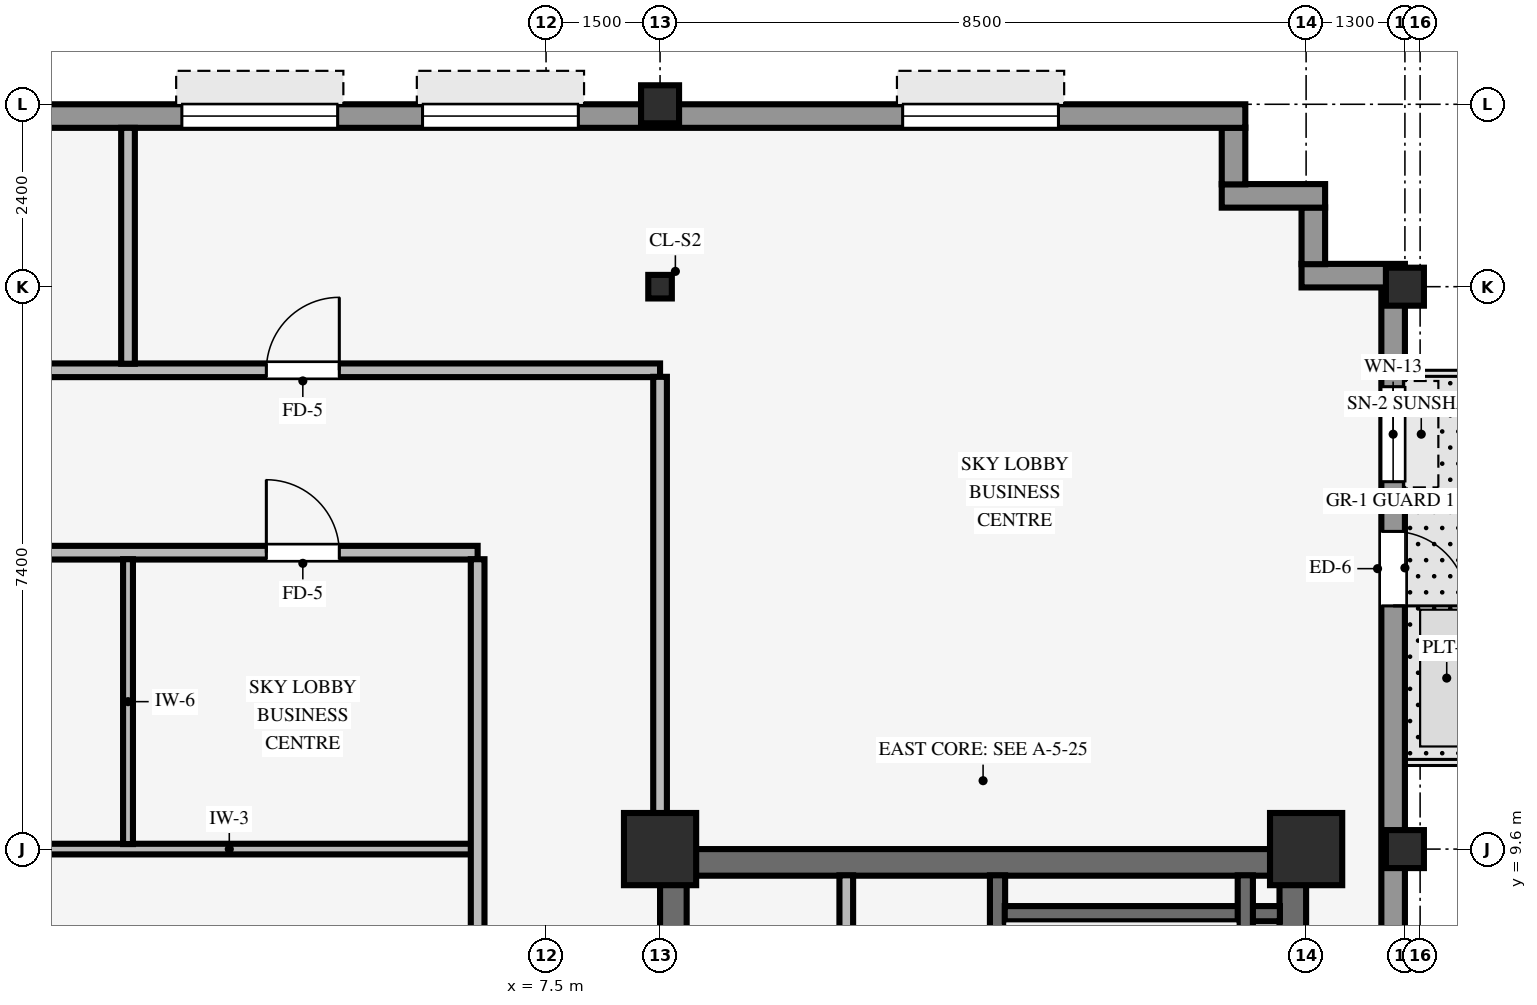
"""IFC4 building model, lengths in metres.
Left out: names, types, materials, properties, quantities, classifications, styles, units other than length and angle.
Written with IfcOpenShell. Run it as: python <this file> out.ifc"""

import sys

from ifc_helpers import new_model, si_unit, direction, frame, frame_2d, origin, origin_2d, place, context, subcontext, project, spatial, rectangle, hollow_rectangle, i_section, extrude, source, transform, mapped, element, fill, save


model = new_model("IFC4")
c1 = context("Model", 3, precision=1e-05, world=origin(), true_north=direction((0.0, 1.0)))
c2 = subcontext(c1, "Body", "Model", "MODEL_VIEW")
j1 = project(units=[si_unit("LENGTHUNIT", "METRE"), si_unit("PLANEANGLEUNIT", "RADIAN")], contexts=[c1])
p1 = place(None, origin())
s1 = spatial("IfcSite", under=j1, at=p1, CompositionType="ELEMENT")
p2 = place(p1, origin())
s2 = spatial("IfcBuilding", under=s1, at=p2, CompositionType="ELEMENT")
p3 = place(p2, frame((0.0, 0.0, 223.75)))
s3 = spatial("IfcBuildingStorey", under=s2, at=p3, CompositionType="ELEMENT", Elevation=223.75)
p4 = place(p3, frame((9.0, 9.425, 0.0), z_axis=(0.0, 0.0, 1.0), x_axis=(1.0, 0.0, 0.0)))
e1 = element("IfcWall", 1, at=p4, inside=s3, PredefinedType="SHEAR", context=c2, shape_type="SweptSolid", body=[
    extrude(rectangle(XDim=8.5, YDim=0.35, at=frame_2d((4.25, 0.0))), origin(), (0.0, 0.0, 1.0), 3.37),
])
p5 = place(p3, frame((9.175, -9.255, 0.0), z_axis=(0.0, 0.0, 1.0), x_axis=(0.0, 1.0, 0.0)))
e2 = element("IfcWall", 2, at=p5, inside=s3, PredefinedType="SHEAR", context=c2, shape_type="SweptSolid", body=[
    extrude(rectangle(XDim=18.51, YDim=0.35, at=frame_2d((9.255, 0.0))), origin(), (0.0, 0.0, 1.0), 3.37),
])
p6 = place(p5, frame((8.655, 0.0, 0.0)))
e3 = element("IfcOpeningElement", 3, at=p6, cuts=e2, PredefinedType="OPENING", context=c2, shape_type="SweptSolid", body=[
    extrude(rectangle(XDim=1.2, YDim=2.15, at=frame_2d((0.6, 1.075))), frame((0.0, 0.185, 0.0), z_axis=(0.0, -1.0, 0.0), x_axis=(1.0, 0.0, 0.0)), (0.0, 0.0, 1.0), 0.37),
])
p7 = place(p3, frame((17.325, -9.255, 0.0), z_axis=(0.0, 0.0, 1.0), x_axis=(0.0, 1.0, 0.0)))
e4 = element("IfcWall", 4, at=p7, inside=s3, PredefinedType="SHEAR", context=c2, shape_type="SweptSolid", body=[
    extrude(rectangle(XDim=18.51, YDim=0.35, at=frame_2d((9.255, 0.0))), origin(), (0.0, 0.0, 1.0), 3.37),
])
for number, where, z_axis, x_axis in (
    (5, (9.0, 9.6, 0.0), (0.0, 0.0, 1.0), (1.0, 0.0, 0.0)),
    (6, (17.5, 9.6, 0.0), (0.0, 0.0, 1.0), (1.0, 0.0, 0.0)),
):
    element("IfcColumn", number, at=place(p3, frame(where, z_axis=z_axis, x_axis=x_axis)), inside=s3, PredefinedType="COLUMN", context=c2, shape_type="SweptSolid", body=[
        extrude(rectangle(XDim=0.95, YDim=0.95, at=origin_2d()), origin(), (0.0, 0.0, 1.0), 3.37),
    ])
for number, where, z_axis, x_axis in (
    (7, (18.8, 9.6, 0.0), (0.0, 0.0, 1.0), (1.0, 0.0, 0.0)),
    (8, (18.8, 17.0, 0.0), (0.0, 0.0, 1.0), (1.0, 0.0, 0.0)),
    (9, (9.0, 19.4, 0.0), (0.0, 0.0, 1.0), (1.0, 0.0, 0.0)),
):
    element("IfcColumn", number, at=place(p3, frame(where, z_axis=z_axis, x_axis=x_axis)), inside=s3, PredefinedType="COLUMN", context=c2, shape_type="SweptSolid", body=[
        extrude(hollow_rectangle(XDim=0.5, YDim=0.5, WallThickness=0.032, InnerFilletRadius=0.032, OuterFilletRadius=0.064, at=origin_2d()), origin(), (0.0, 0.0, 1.0), 3.37),
    ])
p8 = place(p3, frame((9.0, 17.0, 0.0), z_axis=(0.0, 0.0, 1.0), x_axis=(1.0, 0.0, 0.0)))
e10 = element("IfcColumn", 10, at=p8, inside=s3, PredefinedType="COLUMN", context=c2, shape_type="SweptSolid", body=[
    extrude(i_section(OverallWidth=0.31, OverallDepth=0.31, WebThickness=0.015, FlangeThickness=0.015, FilletRadius=0.015, at=origin_2d()), origin(), (0.0, 0.0, 1.0), 3.37),
])
p9 = place(p3, frame((18.645, -16.994, 0.0), z_axis=(0.0, 0.0, 1.0), x_axis=(0.0, 1.0, 0.0)))
e11 = element("IfcWall", 11, at=p9, inside=s3, PredefinedType="STANDARD", context=c2, shape_type="SweptSolid", body=[
    extrude(rectangle(XDim=33.988, YDim=0.31, at=frame_2d((16.994, 0.0))), origin(), (0.0, 0.0, 1.0), 2.705),
])
p10 = place(p9, frame((30.774, 0.0, 0.0), z_axis=(0.0, 0.0, 1.0), x_axis=(-1.0, 0.0, 0.0)))
e12 = element("IfcOpeningElement", 12, at=p10, cuts=e11, PredefinedType="OPENING", context=c2, shape_type="SweptSolid", body=[
    extrude(rectangle(XDim=0.98, YDim=2.15, at=frame_2d((0.49, 1.075))), frame((0.0, 0.165, 0.0), z_axis=(0.0, -1.0, 0.0), x_axis=(1.0, 0.0, 0.0)), (0.0, 0.0, 1.0), 0.33),
])
p11 = place(p9, frame((2.66, 0.0, 0.8)))
e13 = element("IfcOpeningElement", 13, at=p11, cuts=e11, PredefinedType="OPENING", context=c2, shape_type="SweptSolid", body=[
    extrude(rectangle(XDim=1.25, YDim=1.52, at=frame_2d((0.625, 0.76))), frame((0.0, 0.165, 0.0), z_axis=(0.0, -1.0, 0.0), x_axis=(1.0, 0.0, 0.0)), (0.0, 0.0, 1.0), 0.33),
])
p12 = place(p9, frame((31.428, 0.0, 0.8)))
e14 = element("IfcOpeningElement", 14, at=p12, cuts=e11, PredefinedType="OPENING", context=c2, shape_type="SweptSolid", body=[
    extrude(rectangle(XDim=1.25, YDim=1.52, at=frame_2d((0.625, 0.76))), frame((0.0, 0.165, 0.0), z_axis=(0.0, -1.0, 0.0), x_axis=(1.0, 0.0, 0.0)), (0.0, 0.0, 1.0), 0.33),
])
p13 = place(p3, frame((17.44, 17.145, 0.0), z_axis=(0.0, 0.0, 1.0), x_axis=(1.0, 0.0, 0.0)))
e15 = element("IfcWall", 15, at=p13, inside=s3, PredefinedType="STANDARD", context=c2, shape_type="SweptSolid", body=[
    extrude(rectangle(XDim=1.36, YDim=0.31, at=frame_2d((0.68, 0.0))), origin(), (0.0, 0.0, 1.0), 2.892),
])
p14 = place(p3, frame((17.595, 17.296, 0.0), z_axis=(0.0, 0.0, 1.0), x_axis=(0.0, 1.0, 0.0)))
e16 = element("IfcWall", 16, at=p14, inside=s3, PredefinedType="STANDARD", context=c2, shape_type="SweptSolid", body=[
    extrude(rectangle(XDim=0.748, YDim=0.31, at=frame_2d((0.374, 0.0))), origin(), (0.0, 0.0, 1.0), 2.892),
])
p15 = place(p3, frame((16.39, 18.195, 0.0), z_axis=(0.0, 0.0, 1.0), x_axis=(1.0, 0.0, 0.0)))
e17 = element("IfcWall", 17, at=p15, inside=s3, PredefinedType="STANDARD", context=c2, shape_type="SweptSolid", body=[
    extrude(rectangle(XDim=1.36, YDim=0.31, at=frame_2d((0.68, 0.0))), origin(), (0.0, 0.0, 1.0), 2.892),
])
p16 = place(p3, frame((16.545, 18.346, 0.0), z_axis=(0.0, 0.0, 1.0), x_axis=(0.0, 1.0, 0.0)))
e18 = element("IfcWall", 18, at=p16, inside=s3, PredefinedType="STANDARD", context=c2, shape_type="SweptSolid", body=[
    extrude(rectangle(XDim=0.748, YDim=0.31, at=frame_2d((0.374, 0.0))), origin(), (0.0, 0.0, 1.0), 2.892),
])
p17 = place(p3, frame((-0.2, 19.245, 0.0), z_axis=(0.0, 0.0, 1.0), x_axis=(1.0, 0.0, 0.0)))
e19 = element("IfcWall", 19, at=p17, inside=s3, PredefinedType="STANDARD", context=c2, shape_type="SweptSolid", body=[
    extrude(rectangle(XDim=16.9, YDim=0.31, at=frame_2d((8.45, 0.0))), origin(), (0.0, 0.0, 1.0), 2.705),
])
p18 = place(p17, frame((2.908, 0.0, 0.8)))
e20 = element("IfcOpeningElement", 20, at=p18, cuts=e19, PredefinedType="OPENING", context=c2, shape_type="SweptSolid", body=[
    extrude(rectangle(XDim=2.05, YDim=1.52, at=frame_2d((1.025, 0.76))), frame((0.0, 0.165, 0.0), z_axis=(0.0, -1.0, 0.0), x_axis=(1.0, 0.0, 0.0)), (0.0, 0.0, 1.0), 0.33),
])
p19 = place(p17, frame((6.075, 0.0, 0.8)))
e21 = element("IfcOpeningElement", 21, at=p19, cuts=e19, PredefinedType="OPENING", context=c2, shape_type="SweptSolid", body=[
    extrude(rectangle(XDim=2.05, YDim=1.52, at=frame_2d((1.025, 0.76))), frame((0.0, 0.165, 0.0), z_axis=(0.0, -1.0, 0.0), x_axis=(1.0, 0.0, 0.0)), (0.0, 0.0, 1.0), 0.33),
])
p20 = place(p17, frame((12.392, 0.0, 0.8)))
e22 = element("IfcOpeningElement", 22, at=p20, cuts=e19, PredefinedType="OPENING", context=c2, shape_type="SweptSolid", body=[
    extrude(rectangle(XDim=2.05, YDim=1.52, at=frame_2d((1.025, 0.76))), frame((0.0, 0.165, 0.0), z_axis=(0.0, -1.0, 0.0), x_axis=(1.0, 0.0, 0.0)), (0.0, 0.0, 1.0), 0.33),
])
p21 = place(p3, frame((13.44, 0.9, 0.0), z_axis=(0.0, 0.0, 1.0), x_axis=(0.0, 1.0, 0.0)))
e23 = element("IfcWall", 23, at=p21, inside=s3, PredefinedType="SHEAR", context=c2, shape_type="SweptSolid", body=[
    extrude(rectangle(XDim=8.355, YDim=0.2, at=frame_2d((4.177, 0.0))), origin(), (0.0, 0.0, 1.0), 3.37),
])
p22 = place(p21, frame((0.43, 0.0, 0.0)))
e24 = element("IfcOpeningElement", 24, at=p22, cuts=e23, PredefinedType="OPENING", context=c2, shape_type="SweptSolid", body=[
    extrude(rectangle(XDim=1.1, YDim=2.15, at=frame_2d((0.55, 1.075))), frame((0.0, 0.11, 0.0), z_axis=(0.0, -1.0, 0.0), x_axis=(1.0, 0.0, 0.0)), (0.0, 0.0, 1.0), 0.22),
])
p23 = place(p3, frame((13.535, 8.75, 0.0), z_axis=(0.0, 0.0, 1.0), x_axis=(1.0, 0.0, 0.0)))
e25 = element("IfcWall", 25, at=p23, inside=s3, PredefinedType="SHEAR", context=c2, shape_type="SweptSolid", body=[
    extrude(rectangle(XDim=3.62, YDim=0.2, at=frame_2d((1.81, 0.0))), origin(), (0.0, 0.0, 1.0), 3.37),
])
p24 = place(p3, frame((16.7, 1.095, 0.0), z_axis=(0.0, 0.0, 1.0), x_axis=(0.0, 1.0, 0.0)))
e26 = element("IfcWall", 26, at=p24, inside=s3, PredefinedType="SHEAR", context=c2, shape_type="SweptSolid", body=[
    extrude(rectangle(XDim=8.16, YDim=0.2, at=frame_2d((4.08, 0.0))), origin(), (0.0, 0.0, 1.0), 3.37),
])
p25 = place(p3, frame((11.45, 4.19, 0.0), z_axis=(0.0, 0.0, 1.0), x_axis=(0.0, 1.0, 0.0)))
e27 = element("IfcWall", 27, at=p25, inside=s3, PredefinedType="PARTITIONING", context=c2, shape_type="SweptSolid", body=[
    extrude(rectangle(XDim=5.065, YDim=0.18, at=frame_2d((2.532, 0.0))), origin(), (0.0, 0.0, 1.0), 3.36),
])
p26 = place(p3, frame((0.151, 9.6, 0.0), z_axis=(0.0, 0.0, 1.0), x_axis=(1.0, 0.0, 0.0)))
e28 = element("IfcWall", 28, at=p26, inside=s3, PredefinedType="PARTITIONING", context=c2, shape_type="SweptSolid", body=[
    extrude(rectangle(XDim=6.363, YDim=0.14, at=frame_2d((3.182, 0.0))), origin(), (0.0, 0.0, 1.0), 2.405),
])
p27 = place(p3, frame((-17.7, 13.5, 0.0), z_axis=(0.0, 0.0, 1.0), x_axis=(1.0, 0.0, 0.0)))
e29 = element("IfcWall", 29, at=p27, inside=s3, PredefinedType="PARTITIONING", context=c2, shape_type="SweptSolid", body=[
    extrude(rectangle(XDim=24.3, YDim=0.18, at=frame_2d((12.15, 0.0))), origin(), (0.0, 0.0, 1.0), 3.049),
])
p28 = place(p27, frame((12.97, 0.0, 0.0)))
e30 = element("IfcOpeningElement", 30, at=p28, cuts=e29, PredefinedType="OPENING", context=c2, shape_type="SweptSolid", body=[
    extrude(rectangle(XDim=0.96, YDim=2.1, at=frame_2d((0.48, 1.05))), frame((0.0, 0.1, 0.0), z_axis=(0.0, -1.0, 0.0), x_axis=(1.0, 0.0, 0.0)), (0.0, 0.0, 1.0), 0.2),
])
p29 = place(p27, frame((21.52, 0.0, 0.0)))
e31 = element("IfcOpeningElement", 31, at=p29, cuts=e29, PredefinedType="OPENING", context=c2, shape_type="SweptSolid", body=[
    extrude(rectangle(XDim=0.96, YDim=2.1, at=frame_2d((0.48, 1.05))), frame((0.0, 0.1, 0.0), z_axis=(0.0, -1.0, 0.0), x_axis=(1.0, 0.0, 0.0)), (0.0, 0.0, 1.0), 0.2),
])
p30 = place(p27, frame((3.3, 0.0, 0.0)))
e32 = element("IfcOpeningElement", 32, at=p30, cuts=e29, PredefinedType="OPENING", context=c2, shape_type="SweptSolid", body=[
    extrude(rectangle(XDim=0.9, YDim=2.1, at=frame_2d((0.45, 1.05))), frame((0.0, 0.1, 0.0), z_axis=(0.0, -1.0, 0.0), x_axis=(1.0, 0.0, 0.0)), (0.0, 0.0, 1.0), 0.2),
])
p31 = place(p27, frame((5.65, 0.0, 0.0)))
e33 = element("IfcOpeningElement", 33, at=p31, cuts=e29, PredefinedType="OPENING", context=c2, shape_type="SweptSolid", body=[
    extrude(rectangle(XDim=0.9, YDim=2.1, at=frame_2d((0.45, 1.05))), frame((0.0, 0.1, 0.0), z_axis=(0.0, -1.0, 0.0), x_axis=(1.0, 0.0, 0.0)), (0.0, 0.0, 1.0), 0.2),
])
p32 = place(p3, frame((-26.09, 15.9, 0.0), z_axis=(0.0, 0.0, 1.0), x_axis=(1.0, 0.0, 0.0)))
e34 = element("IfcWall", 34, at=p32, inside=s3, PredefinedType="PARTITIONING", context=c2, shape_type="SweptSolid", body=[
    extrude(rectangle(XDim=35.09, YDim=0.18, at=frame_2d((17.545, 0.0))), origin(), (0.0, 0.0, 1.0), 3.36),
])
p33 = place(p32, frame((17.76, 0.0, 0.0)))
e35 = element("IfcOpeningElement", 35, at=p33, cuts=e34, PredefinedType="OPENING", context=c2, shape_type="SweptSolid", body=[
    extrude(rectangle(XDim=0.96, YDim=2.1, at=frame_2d((0.48, 1.05))), frame((0.0, 0.1, 0.0), z_axis=(0.0, -1.0, 0.0), x_axis=(1.0, 0.0, 0.0)), (0.0, 0.0, 1.0), 0.2),
])
p34 = place(p32, frame((29.91, 0.0, 0.0)))
e36 = element("IfcOpeningElement", 36, at=p34, cuts=e34, PredefinedType="OPENING", context=c2, shape_type="SweptSolid", body=[
    extrude(rectangle(XDim=0.96, YDim=2.1, at=frame_2d((0.48, 1.05))), frame((0.0, 0.1, 0.0), z_axis=(0.0, -1.0, 0.0), x_axis=(1.0, 0.0, 0.0)), (0.0, 0.0, 1.0), 0.2),
])
p35 = place(p3, frame((2.0, 9.666, 0.0), z_axis=(0.0, 0.0, 1.0), x_axis=(0.0, 1.0, 0.0)))
e37 = element("IfcWall", 37, at=p35, inside=s3, PredefinedType="PARTITIONING", context=c2, shape_type="SweptSolid", body=[
    extrude(rectangle(XDim=3.748, YDim=0.13, at=frame_2d((1.874, 0.0))), origin(), (0.0, 0.0, 1.0), 3.36),
])
p36 = place(p3, frame((2.0, 15.986, 0.0), z_axis=(0.0, 0.0, 1.0), x_axis=(0.0, 1.0, 0.0)))
e38 = element("IfcWall", 38, at=p36, inside=s3, PredefinedType="PARTITIONING", context=c2, shape_type="SweptSolid", body=[
    extrude(rectangle(XDim=3.104, YDim=0.18, at=frame_2d((1.552, 0.0))), origin(), (0.0, 0.0, 1.0), 3.36),
])
p37 = place(p3, frame((6.6, 1.336, 0.0), z_axis=(0.0, 0.0, 1.0), x_axis=(0.0, 1.0, 0.0)))
e39 = element("IfcWall", 39, at=p37, inside=s3, PredefinedType="PARTITIONING", context=c2, shape_type="SweptSolid", body=[
    extrude(rectangle(XDim=12.078, YDim=0.18, at=frame_2d((6.039, 0.0))), origin(), (0.0, 0.0, 1.0), 3.36),
])
p38 = place(p3, frame((9.0, 10.071, 0.0), z_axis=(0.0, 0.0, 1.0), x_axis=(0.0, 1.0, 0.0)))
e40 = element("IfcWall", 40, at=p38, inside=s3, PredefinedType="PARTITIONING", context=c2, shape_type="SweptSolid", body=[
    extrude(rectangle(XDim=5.743, YDim=0.18, at=frame_2d((2.872, 0.0))), origin(), (0.0, 0.0, 1.0), 2.892),
])
m1 = source(origin(), c2, "Body", "SweptSolid", [
    extrude(rectangle(XDim=0.98, YDim=2.15, at=frame_2d((0.49, 1.075))), frame((0.0, 0.025, 0.0), z_axis=(0.0, -1.0, 0.0), x_axis=(1.0, 0.0, 0.0)), (0.0, 0.0, 1.0), 0.05),
])
p39 = place(p10, origin())
e41 = element("IfcDoor", 41, at=p39, inside=s3, OperationType="SINGLE_SWING_RIGHT", PredefinedType="DOOR", context=c2, shape_type="MappedRepresentation", body=[
    mapped(m1, transform((0.0, 0.0, 0.0), scale=1.0)),
])
fill(e12, e41)
m2 = source(origin(), c2, "Body", "SweptSolid", [
    extrude(rectangle(XDim=1.25, YDim=1.52, at=frame_2d((0.625, 0.76))), frame((0.0, 0.03, 0.0), z_axis=(0.0, -1.0, 0.0), x_axis=(1.0, 0.0, 0.0)), (0.0, 0.0, 1.0), 0.06),
])
p40 = place(p12, origin())
e42 = element("IfcWindow", 42, at=p40, inside=s3, PartitioningType="SINGLE_PANEL", PredefinedType="WINDOW", context=c2, shape_type="MappedRepresentation", body=[
    mapped(m2, transform((0.0, 0.0, 0.0), scale=1.0)),
])
fill(e14, e42)
m3 = source(origin(), c2, "Body", "SweptSolid", [
    extrude(rectangle(XDim=2.05, YDim=1.52, at=frame_2d((1.025, 0.76))), frame((0.0, 0.03, 0.0), z_axis=(0.0, -1.0, 0.0), x_axis=(1.0, 0.0, 0.0)), (0.0, 0.0, 1.0), 0.06),
])
p41 = place(p18, origin())
e43 = element("IfcWindow", 43, at=p41, inside=s3, PartitioningType="SINGLE_PANEL", PredefinedType="WINDOW", context=c2, shape_type="MappedRepresentation", body=[
    mapped(m3, transform((0.0, 0.0, 0.0), scale=1.0)),
])
fill(e20, e43)
p42 = place(p19, origin())
e44 = element("IfcWindow", 44, at=p42, inside=s3, PartitioningType="SINGLE_PANEL", PredefinedType="WINDOW", context=c2, shape_type="MappedRepresentation", body=[
    mapped(m3, transform((0.0, 0.0, 0.0), scale=1.0)),
])
fill(e21, e44)
p43 = place(p20, origin())
e45 = element("IfcWindow", 45, at=p43, inside=s3, PartitioningType="SINGLE_PANEL", PredefinedType="WINDOW", context=c2, shape_type="MappedRepresentation", body=[
    mapped(m3, transform((0.0, 0.0, 0.0), scale=1.0)),
])
fill(e22, e45)
m4 = source(origin(), c2, "Body", "SweptSolid", [
    extrude(rectangle(XDim=0.96, YDim=2.1, at=frame_2d((0.48, 1.05))), frame((0.0, 0.025, 0.0), z_axis=(0.0, -1.0, 0.0), x_axis=(1.0, 0.0, 0.0)), (0.0, 0.0, 1.0), 0.05),
])
p44 = place(p34, origin())
e46 = element("IfcDoor", 46, at=p44, inside=s3, OperationType="SINGLE_SWING_RIGHT", PredefinedType="DOOR", context=c2, shape_type="MappedRepresentation", body=[
    mapped(m4, transform((0.0, 0.0, 0.0), scale=1.0)),
])
fill(e36, e46)
p45 = place(p29, origin())
e47 = element("IfcDoor", 47, at=p45, inside=s3, OperationType="SINGLE_SWING_LEFT", PredefinedType="DOOR", context=c2, shape_type="MappedRepresentation", body=[
    mapped(m4, transform((0.0, 0.0, 0.0), scale=1.0)),
])
fill(e31, e47)
save(model, sys.argv[1])
